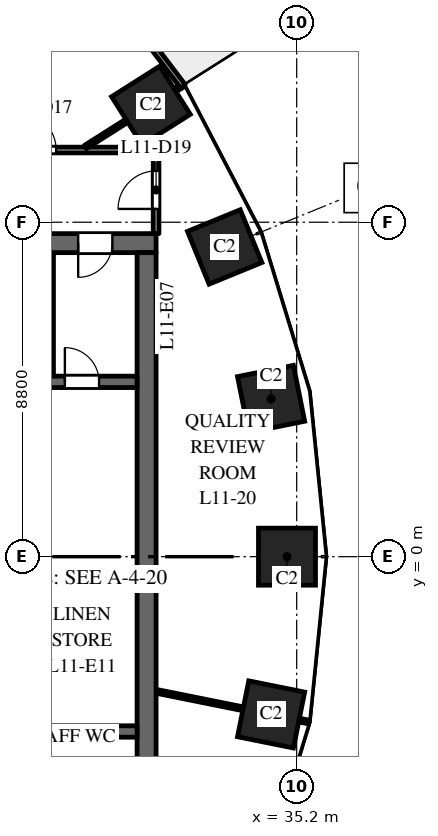
"""IFC4 building model, lengths in metres.
Left out: names, types, materials, properties, quantities, classifications, styles, units other than length and angle.
Written with IfcOpenShell. Run it as: python <this file> out.ifc"""

import sys

from ifc_helpers import new_model, si_unit, direction, frame, frame_2d, origin, origin_2d, place, context, subcontext, project, spatial, rectangle, extrude, element, fill, save


model = new_model("IFC4")
c1 = context("Model", 3, precision=1e-05, world=origin(), true_north=direction((0.0, 1.0)))
c2 = subcontext(c1, "Body", "Model", "MODEL_VIEW")
j1 = project(units=[si_unit("LENGTHUNIT", "METRE"), si_unit("PLANEANGLEUNIT", "RADIAN")], contexts=[c1])
p1 = place(None, origin())
s1 = spatial("IfcSite", under=j1, at=p1, CompositionType="ELEMENT")
p2 = place(p1, origin())
s2 = spatial("IfcBuilding", under=s1, at=p2, CompositionType="ELEMENT")
p3 = place(p2, frame((0.0, 0.0, 54.5)))
s3 = spatial("IfcBuildingStorey", under=s2, at=p3, CompositionType="ELEMENT", Elevation=54.5)
for number, where, z_axis, x_axis in (
    (1, (34.945, 0.0, 0.0), (0.0, 0.0, 1.0), (0.0, 1.0, 0.0)),
    (2, (34.527, 4.151, 0.0), (0.0, 0.0, 1.0), (-0.197, 0.98, 0.0)),
    (3, (33.305, 8.149, 0.0), (0.0, 0.0, 1.0), (-0.379, 0.925, 0.0)),
    (4, (31.365, 11.871, 0.0), (0.0, 0.0, 1.0), (-0.535, 0.845, 0.0)),
    (5, (34.527, -4.151, 0.0), (0.0, 0.0, 1.0), (0.197, 0.98, 0.0)),
):
    element("IfcColumn", number, at=place(p3, frame(where, z_axis=z_axis, x_axis=x_axis)), inside=s3, PredefinedType="COLUMN", context=c2, shape_type="SweptSolid", body=[
        extrude(rectangle(XDim=1.5, YDim=1.5, at=origin_2d()), origin(), (0.0, 0.0, 1.0), 4.0),
    ])
p4 = place(p3, frame((16.5, 8.25, 0.0), z_axis=(0.0, 0.0, 1.0), x_axis=(1.0, 0.0, 0.0)))
e6 = element("IfcWall", 6, at=p4, inside=s3, PredefinedType="SHEAR", context=c2, shape_type="SweptSolid", body=[
    extrude(rectangle(XDim=15.0, YDim=0.5, at=frame_2d((7.5, 0.0))), origin(), (0.0, 0.0, 1.0), 3.7),
])
p5 = place(p4, frame((6.9, 0.0, 0.0)))
e7 = element("IfcOpeningElement", 7, at=p5, cuts=e6, PredefinedType="OPENING", context=c2, shape_type="SweptSolid", body=[
    extrude(rectangle(XDim=1.2, YDim=2.1, at=frame_2d((0.6, 1.05))), frame((0.0, 0.26, 0.0), z_axis=(0.0, -1.0, 0.0), x_axis=(1.0, 0.0, 0.0)), (0.0, 0.0, 1.0), 0.52),
])
p6 = place(p4, frame((12.95, 0.0, 0.0)))
e8 = element("IfcOpeningElement", 8, at=p6, cuts=e6, PredefinedType="OPENING", context=c2, shape_type="SweptSolid", body=[
    extrude(rectangle(XDim=0.9, YDim=2.1, at=frame_2d((0.45, 1.05))), frame((0.0, 0.26, 0.0), z_axis=(0.0, -1.0, 0.0), x_axis=(1.0, 0.0, 0.0)), (0.0, 0.0, 1.0), 0.52),
])
p7 = place(p3, frame((31.25, -8.0, 0.0), z_axis=(0.0, 0.0, 1.0), x_axis=(0.0, 1.0, 0.0)))
e9 = element("IfcWall", 9, at=p7, inside=s3, PredefinedType="SHEAR", context=c2, shape_type="SweptSolid", body=[
    extrude(rectangle(XDim=16.0, YDim=0.5, at=frame_2d((8.0, 0.0))), origin(), (0.0, 0.0, 1.0), 3.7),
])
p8 = place(p3, frame((24.9, 4.6, 0.0), z_axis=(0.0, 0.0, 1.0), x_axis=(1.0, 0.0, 0.0)))
e10 = element("IfcWall", 10, at=p8, inside=s3, PredefinedType="SHEAR", context=c2, shape_type="SweptSolid", body=[
    extrude(rectangle(XDim=6.1, YDim=0.3, at=frame_2d((3.05, 0.0))), origin(), (0.0, 0.0, 1.0), 3.7),
])
p9 = place(p8, frame((4.2, 0.0, 0.0)))
e11 = element("IfcOpeningElement", 11, at=p9, cuts=e10, PredefinedType="OPENING", context=c2, shape_type="SweptSolid", body=[
    extrude(rectangle(XDim=0.9, YDim=2.1, at=frame_2d((0.45, 1.05))), frame((0.0, 0.16, 0.0), z_axis=(0.0, -1.0, 0.0), x_axis=(1.0, 0.0, 0.0)), (0.0, 0.0, 1.0), 0.32),
])
p10 = place(p3, frame((28.7, 4.75, 0.0), z_axis=(0.0, 0.0, 1.0), x_axis=(0.0, 1.0, 0.0)))
e12 = element("IfcWall", 12, at=p10, inside=s3, PredefinedType="PARTITIONING", context=c2, shape_type="SweptSolid", body=[
    extrude(rectangle(XDim=3.25, YDim=0.2, at=frame_2d((1.625, 0.0))), origin(), (0.0, 0.0, 1.0), 3.7),
])
p11 = place(p3, frame((24.9, -4.6, 0.0), z_axis=(0.0, 0.0, 1.0), x_axis=(1.0, 0.0, 0.0)))
e13 = element("IfcWall", 13, at=p11, inside=s3, PredefinedType="SHEAR", context=c2, shape_type="SweptSolid", body=[
    extrude(rectangle(XDim=6.1, YDim=0.3, at=frame_2d((3.05, 0.0))), origin(), (0.0, 0.0, 1.0), 3.7),
])
p12 = place(p3, frame((32.208, 12.374, 0.0), z_axis=(0.0, 0.0, 1.0), x_axis=(-0.604045763106, 0.796949632081, 0.0)))
e14 = element("IfcWall", 14, at=p12, inside=s3, PredefinedType="STANDARD", context=c2, shape_type="SweptSolid", body=[
    extrude(rectangle(XDim=4.423, YDim=0.15, at=frame_2d((2.212, 0.0))), origin(), (0.0, 0.0, 1.0), 3.7),
])
p13 = place(p12, frame((1.712, 0.0, 0.0)))
e15 = element("IfcOpeningElement", 15, at=p13, cuts=e14, PredefinedType="OPENING", context=c2, shape_type="SweptSolid", body=[
    extrude(rectangle(XDim=1.0, YDim=2.4, at=frame_2d((0.5, 1.2))), frame((0.0, 0.085, 0.0), z_axis=(0.0, -1.0, 0.0), x_axis=(1.0, 0.0, 0.0)), (0.0, 0.0, 1.0), 0.17),
])
p14 = place(p3, frame((16.5, 10.7, 0.0), z_axis=(0.0, 0.0, 1.0), x_axis=(1.0, 0.0, 0.0)))
e16 = element("IfcWall", 16, at=p14, inside=s3, PredefinedType="PARTITIONING", context=c2, shape_type="SweptSolid", body=[
    extrude(rectangle(XDim=15.0, YDim=0.15, at=frame_2d((7.5, 0.0))), origin(), (0.0, 0.0, 1.0), 2.75),
])
p15 = place(p14, frame((11.371, 0.0, 0.0)))
e17 = element("IfcOpeningElement", 17, at=p15, cuts=e16, PredefinedType="OPENING", context=c2, shape_type="SweptSolid", body=[
    extrude(rectangle(XDim=1.0, YDim=2.1, at=frame_2d((0.5, 1.05))), frame((0.0, 0.085, 0.0), z_axis=(0.0, -1.0, 0.0), x_axis=(1.0, 0.0, 0.0)), (0.0, 0.0, 1.0), 0.17),
])
p16 = place(p3, frame((29.637, 10.777, 0.0), z_axis=(0.0, 0.0, 1.0), x_axis=(0.844810627195, 0.535065420467, 0.0)))
e18 = element("IfcWall", 18, at=p16, inside=s3, PredefinedType="PARTITIONING", context=c2, shape_type="SweptSolid", body=[
    extrude(rectangle(XDim=3.048, YDim=0.1, at=frame_2d((1.524, 0.0))), origin(), (0.0, 0.0, 1.0), 2.85),
])
p17 = place(p3, frame((31.5, -3.542, 0.0), z_axis=(0.0, 0.0, 1.0), x_axis=(0.980357474535, -0.197228857227, 0.0)))
e19 = element("IfcWall", 19, at=p17, inside=s3, PredefinedType="PARTITIONING", context=c2, shape_type="SweptSolid", body=[
    extrude(rectangle(XDim=4.092, YDim=0.1, at=frame_2d((2.046, 0.0))), origin(), (0.0, 0.0, 1.0), 2.85),
])
p18 = place(p3, frame((31.5, 8.5, 0.0), z_axis=(0.0, 0.0, 1.0), x_axis=(0.0, 1.0, 0.0)))
e20 = element("IfcWall", 20, at=p18, inside=s3, PredefinedType="PARTITIONING", context=c2, shape_type="SweptSolid", body=[
    extrude(rectangle(XDim=2.2, YDim=0.15, at=frame_2d((1.1, 0.0))), origin(), (0.0, 0.0, 1.0), 2.85),
])
p19 = place(p18, frame((0.65, 0.0, 0.0)))
e21 = element("IfcOpeningElement", 21, at=p19, cuts=e20, PredefinedType="OPENING", context=c2, shape_type="SweptSolid", body=[
    extrude(rectangle(XDim=1.0, YDim=2.1, at=frame_2d((0.5, 1.05))), frame((0.0, 0.085, 0.0), z_axis=(0.0, -1.0, 0.0), x_axis=(1.0, 0.0, 0.0)), (0.0, 0.0, 1.0), 0.17),
])
p20 = place(p6, origin())
e22 = element("IfcDoor", 22, at=p20, inside=s3, OperationType="SINGLE_SWING_LEFT", PredefinedType="DOOR", context=c2, shape_type="SweptSolid", body=[
    extrude(rectangle(XDim=0.9, YDim=2.1, at=frame_2d((0.45, 1.05))), frame((0.0, 0.025, 0.0), z_axis=(0.0, -1.0, 0.0), x_axis=(1.0, 0.0, 0.0)), (0.0, 0.0, 1.0), 0.05),
])
fill(e8, e22)
p21 = place(p9, origin())
e23 = element("IfcDoor", 23, at=p21, inside=s3, OperationType="SINGLE_SWING_RIGHT", PredefinedType="DOOR", context=c2, shape_type="SweptSolid", body=[
    extrude(rectangle(XDim=0.9, YDim=2.1, at=frame_2d((0.45, 1.05))), frame((0.0, 0.025, 0.0), z_axis=(0.0, -1.0, 0.0), x_axis=(1.0, 0.0, 0.0)), (0.0, 0.0, 1.0), 0.05),
])
fill(e11, e23)
p22 = place(p15, origin())
e24 = element("IfcDoor", 24, at=p22, inside=s3, OperationType="SINGLE_SWING_LEFT", PredefinedType="DOOR", context=c2, shape_type="SweptSolid", body=[
    extrude(rectangle(XDim=1.0, YDim=2.1, at=frame_2d((0.5, 1.05))), frame((0.0, 0.025, 0.0), z_axis=(0.0, -1.0, 0.0), x_axis=(1.0, 0.0, 0.0)), (0.0, 0.0, 1.0), 0.05),
])
fill(e17, e24)
p23 = place(p19, origin())
e25 = element("IfcDoor", 25, at=p23, inside=s3, OperationType="SINGLE_SWING_LEFT", PredefinedType="DOOR", context=c2, shape_type="SweptSolid", body=[
    extrude(rectangle(XDim=1.0, YDim=2.1, at=frame_2d((0.5, 1.05))), frame((0.0, 0.025, 0.0), z_axis=(0.0, -1.0, 0.0), x_axis=(1.0, 0.0, 0.0)), (0.0, 0.0, 1.0), 0.05),
])
fill(e21, e25)
save(model, sys.argv[1])
